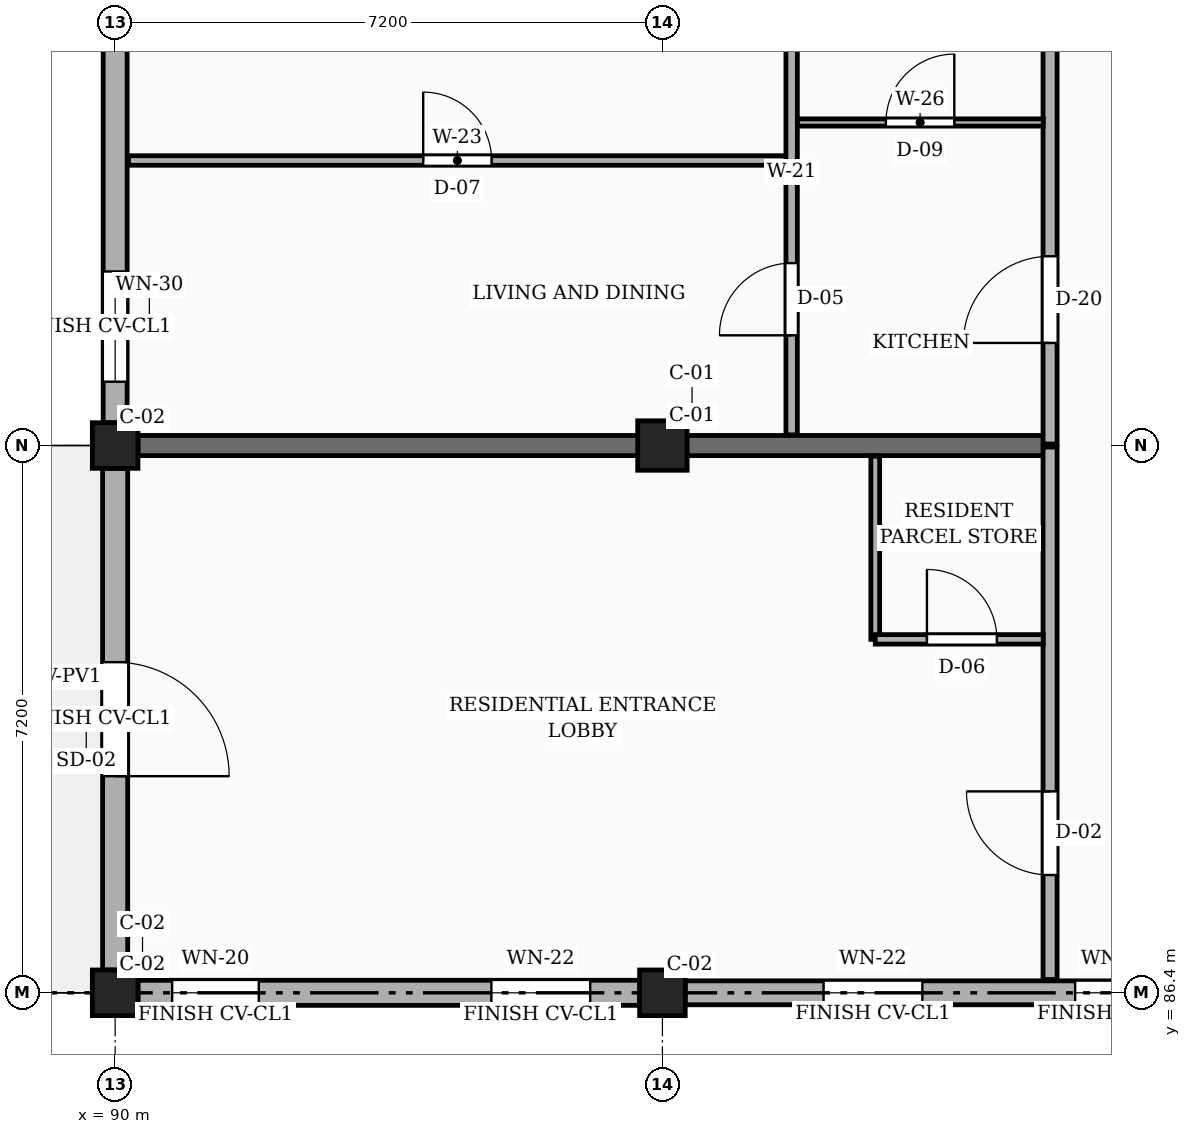
"""IFC4 building model, lengths in metres.
Left out: names, types, materials, properties, quantities, classifications, styles, units other than length and angle.
Written with IfcOpenShell. Run it as: python <this file> out.ifc"""

import sys

from ifc_helpers import new_model, si_unit, direction, frame, frame_2d, origin, origin_2d, place, context, subcontext, project, spatial, rectangle, extrude, element, fill, save


model = new_model("IFC4")
c1 = context("Model", 3, precision=1e-05, world=origin(), true_north=direction((0.0, 1.0)))
c2 = subcontext(c1, "Body", "Model", "MODEL_VIEW")
j1 = project(units=[si_unit("LENGTHUNIT", "METRE"), si_unit("PLANEANGLEUNIT", "RADIAN")], contexts=[c1])
p1 = place(None, origin())
s1 = spatial("IfcSite", under=j1, at=p1, CompositionType="ELEMENT")
p2 = place(p1, origin())
s2 = spatial("IfcBuilding", under=s1, at=p2, CompositionType="ELEMENT")
p3 = place(p2, origin())
s3 = spatial("IfcBuildingStorey", under=s2, at=p3, CompositionType="ELEMENT", Elevation=0.0)
for number, where, z_axis, x_axis in (
    (1, (90.0, 86.4, 0.0), (0.0, 0.0, 1.0), (1.0, 0.0, 0.0)),
    (2, (90.0, 93.6, 0.0), (0.0, 0.0, 1.0), (1.0, 0.0, 0.0)),
    (3, (97.2, 86.4, 0.0), (0.0, 0.0, 1.0), (1.0, 0.0, 0.0)),
):
    element("IfcColumn", number, at=place(p3, frame(where, z_axis=z_axis, x_axis=x_axis)), inside=s3, PredefinedType="COLUMN", context=c2, shape_type="SweptSolid", body=[
        extrude(rectangle(XDim=0.6, YDim=0.6, at=origin_2d()), origin(), (0.0, 0.0, 1.0), 4.5),
    ])
p4 = place(p3, frame((97.2, 93.6, 0.0), z_axis=(0.0, 0.0, 1.0), x_axis=(1.0, 0.0, 0.0)))
e4 = element("IfcColumn", 4, at=p4, inside=s3, PredefinedType="COLUMN", context=c2, shape_type="SweptSolid", body=[
    extrude(rectangle(XDim=0.65, YDim=0.65, at=origin_2d()), origin(), (0.0, 0.0, 1.0), 4.5),
])
p5 = place(p3, frame((90.3, 93.6, 0.0), z_axis=(0.0, 0.0, 1.0), x_axis=(1.0, 0.0, 0.0)))
e5 = element("IfcWall", 5, at=p5, inside=s3, PredefinedType="SOLIDWALL", context=c2, shape_type="SweptSolid", body=[
    extrude(rectangle(XDim=12.0, YDim=0.265, at=frame_2d((6.0, 0.0))), origin(), (0.0, 0.0, 1.0), 3.54),
])
p6 = place(p3, frame((90.3, 86.4, 0.0), z_axis=(0.0, 0.0, 1.0), x_axis=(1.0, 0.0, 0.0)))
e6 = element("IfcWall", 6, at=p6, inside=s3, PredefinedType="SOLIDWALL", context=c2, shape_type="SweptSolid", body=[
    extrude(rectangle(XDim=6.6, YDim=0.33, at=frame_2d((3.3, 0.0))), origin(), (0.0, 0.0, 1.0), 3.81),
])
p7 = place(p6, frame((0.45, 0.0, 0.78)))
e7 = element("IfcOpeningElement", 7, at=p7, cuts=e6, PredefinedType="OPENING", context=c2, shape_type="SweptSolid", body=[
    extrude(rectangle(XDim=1.14, YDim=1.36, at=frame_2d((0.57, 0.68))), frame((0.0, 0.175, 0.0), z_axis=(0.0, -1.0, 0.0), x_axis=(1.0, 0.0, 0.0)), (0.0, 0.0, 1.0), 0.35),
])
p8 = place(p6, frame((4.65, 0.0, 0.78)))
e8 = element("IfcOpeningElement", 8, at=p8, cuts=e6, PredefinedType="OPENING", context=c2, shape_type="SweptSolid", body=[
    extrude(rectangle(XDim=1.3, YDim=1.36, at=frame_2d((0.65, 0.68))), frame((0.0, 0.175, 0.0), z_axis=(0.0, -1.0, 0.0), x_axis=(1.0, 0.0, 0.0)), (0.0, 0.0, 1.0), 0.35),
])
p9 = place(p3, frame((97.5, 86.4, 0.0), z_axis=(0.0, 0.0, 1.0), x_axis=(1.0, 0.0, 0.0)))
e9 = element("IfcWall", 9, at=p9, inside=s3, PredefinedType="SOLIDWALL", context=c2, shape_type="SweptSolid", body=[
    extrude(rectangle(XDim=6.64, YDim=0.315, at=frame_2d((3.32, 0.0))), origin(), (0.0, 0.0, 1.0), 3.81),
])
p10 = place(p9, frame((1.82, 0.0, 0.78)))
e10 = element("IfcOpeningElement", 10, at=p10, cuts=e9, PredefinedType="OPENING", context=c2, shape_type="SweptSolid", body=[
    extrude(rectangle(XDim=1.3, YDim=1.36, at=frame_2d((0.65, 0.68))), frame((0.0, 0.167, 0.0), z_axis=(0.0, -1.0, 0.0), x_axis=(1.0, 0.0, 0.0)), (0.0, 0.0, 1.0), 0.335),
])
p11 = place(p9, frame((5.13, 0.0, 0.78)))
e11 = element("IfcOpeningElement", 11, at=p11, cuts=e9, PredefinedType="OPENING", context=c2, shape_type="SweptSolid", body=[
    extrude(rectangle(XDim=1.04, YDim=1.26, at=frame_2d((0.52, 0.63))), frame((0.0, 0.167, 0.0), z_axis=(0.0, -1.0, 0.0), x_axis=(1.0, 0.0, 0.0)), (0.0, 0.0, 1.0), 0.335),
])
p12 = place(p3, frame((90.0, 100.54, 0.0), z_axis=(0.0, 0.0, 1.0), x_axis=(0.0, -1.0, 0.0)))
e12 = element("IfcWall", 12, at=p12, inside=s3, PredefinedType="SOLIDWALL", context=c2, shape_type="SweptSolid", body=[
    extrude(rectangle(XDim=6.64, YDim=0.315, at=frame_2d((3.32, 0.0))), origin(), (0.0, 0.0, 1.0), 3.81),
])
p13 = place(p12, frame((0.45, 0.0, 0.78)))
e13 = element("IfcOpeningElement", 13, at=p13, cuts=e12, PredefinedType="OPENING", context=c2, shape_type="SweptSolid", body=[
    extrude(rectangle(XDim=1.25, YDim=1.44, at=frame_2d((0.625, 0.72))), frame((0.0, 0.167, 0.0), z_axis=(0.0, -1.0, 0.0), x_axis=(1.0, 0.0, 0.0)), (0.0, 0.0, 1.0), 0.335),
])
p14 = place(p12, frame((4.65, 0.0, 0.78)))
e14 = element("IfcOpeningElement", 14, at=p14, cuts=e12, PredefinedType="OPENING", context=c2, shape_type="SweptSolid", body=[
    extrude(rectangle(XDim=1.45, YDim=1.44, at=frame_2d((0.725, 0.72))), frame((0.0, 0.167, 0.0), z_axis=(0.0, -1.0, 0.0), x_axis=(1.0, 0.0, 0.0)), (0.0, 0.0, 1.0), 0.335),
])
p15 = place(p3, frame((90.0, 93.3, 0.0), z_axis=(0.0, 0.0, 1.0), x_axis=(0.0, -1.0, 0.0)))
e15 = element("IfcWall", 15, at=p15, inside=s3, PredefinedType="SOLIDWALL", context=c2, shape_type="SweptSolid", body=[
    extrude(rectangle(XDim=6.6, YDim=0.33, at=frame_2d((3.3, 0.0))), origin(), (0.0, 0.0, 1.0), 3.81),
])
p16 = place(p15, frame((2.55, 0.0, 0.0)))
e16 = element("IfcOpeningElement", 16, at=p16, cuts=e15, PredefinedType="OPENING", context=c2, shape_type="SweptSolid", body=[
    extrude(rectangle(XDim=1.5, YDim=2.2, at=frame_2d((0.75, 1.1))), frame((0.0, 0.175, 0.0), z_axis=(0.0, -1.0, 0.0), x_axis=(1.0, 0.0, 0.0)), (0.0, 0.0, 1.0), 0.35),
])
p17 = place(p3, frame((102.3, 86.575, 0.0), z_axis=(0.0, 0.0, 1.0), x_axis=(0.0, 1.0, 0.0)))
e17 = element("IfcWall", 17, at=p17, inside=s3, PredefinedType="PARTITIONING", context=c2, shape_type="SweptSolid", body=[
    extrude(rectangle(XDim=7.005, YDim=0.185, at=frame_2d((3.502, 0.0))), origin(), (0.0, 0.0, 1.0), 3.675),
])
p18 = place(p17, frame((1.375, 0.0, 0.0)))
e18 = element("IfcOpeningElement", 18, at=p18, cuts=e17, PredefinedType="OPENING", context=c2, shape_type="SweptSolid", body=[
    extrude(rectangle(XDim=1.1, YDim=2.15, at=frame_2d((0.55, 1.075))), frame((0.0, 0.103, 0.0), z_axis=(0.0, -1.0, 0.0), x_axis=(1.0, 0.0, 0.0)), (0.0, 0.0, 1.0), 0.205),
])
p19 = place(p3, frame((102.3, 93.62, 0.0), z_axis=(0.0, 0.0, 1.0), x_axis=(0.0, 1.0, 0.0)))
e19 = element("IfcWall", 19, at=p19, inside=s3, PredefinedType="PARTITIONING", context=c2, shape_type="SweptSolid", body=[
    extrude(rectangle(XDim=7.16, YDim=0.185, at=frame_2d((3.58, 0.0))), origin(), (0.0, 0.0, 1.0), 3.675),
])
p20 = place(p19, frame((1.33, 0.0, 0.0)))
e20 = element("IfcOpeningElement", 20, at=p20, cuts=e19, PredefinedType="OPENING", context=c2, shape_type="SweptSolid", body=[
    extrude(rectangle(XDim=1.14, YDim=2.18, at=frame_2d((0.57, 1.09))), frame((0.0, 0.103, 0.0), z_axis=(0.0, -1.0, 0.0), x_axis=(1.0, 0.0, 0.0)), (0.0, 0.0, 1.0), 0.205),
])
p21 = place(p3, frame((100.0, 91.05, 0.0), z_axis=(0.0, 0.0, 1.0), x_axis=(0.0, 1.0, 0.0)))
e21 = element("IfcWall", 21, at=p21, inside=s3, PredefinedType="PARTITIONING", context=c2, shape_type="SweptSolid", body=[
    extrude(rectangle(XDim=2.41, YDim=0.115, at=frame_2d((1.205, 0.0))), origin(), (0.0, 0.0, 1.0), 3.675),
])
p22 = place(p3, frame((100.0, 91.05, 0.0), z_axis=(0.0, 0.0, 1.0), x_axis=(1.0, 0.0, 0.0)))
e22 = element("IfcWall", 22, at=p22, inside=s3, PredefinedType="PARTITIONING", context=c2, shape_type="SweptSolid", body=[
    extrude(rectangle(XDim=2.21, YDim=0.125, at=frame_2d((1.105, 0.0))), origin(), (0.0, 0.0, 1.0), 3.675),
])
p23 = place(p22, frame((0.68, 0.0, 0.0)))
e23 = element("IfcOpeningElement", 23, at=p23, cuts=e22, PredefinedType="OPENING", context=c2, shape_type="SweptSolid", body=[
    extrude(rectangle(XDim=0.92, YDim=2.1, at=frame_2d((0.46, 1.05))), frame((0.0, 0.073, 0.0), z_axis=(0.0, -1.0, 0.0), x_axis=(1.0, 0.0, 0.0)), (0.0, 0.0, 1.0), 0.145),
])
p24 = place(p3, frame((90.175, 97.35, 0.0), z_axis=(0.0, 0.0, 1.0), x_axis=(1.0, 0.0, 0.0)))
e24 = element("IfcWall", 24, at=p24, inside=s3, PredefinedType="PARTITIONING", context=c2, shape_type="SweptSolid", body=[
    extrude(rectangle(XDim=8.655, YDim=0.125, at=frame_2d((4.328, 0.0))), origin(), (0.0, 0.0, 1.0), 3.675),
])
p25 = place(p24, frame((3.877, 0.0, 0.0)))
e25 = element("IfcOpeningElement", 25, at=p25, cuts=e24, PredefinedType="OPENING", context=c2, shape_type="SweptSolid", body=[
    extrude(rectangle(XDim=0.9, YDim=2.1, at=frame_2d((0.45, 1.05))), frame((0.0, 0.073, 0.0), z_axis=(0.0, -1.0, 0.0), x_axis=(1.0, 0.0, 0.0)), (0.0, 0.0, 1.0), 0.145),
])
p26 = place(p3, frame((98.97, 97.85, 0.0), z_axis=(0.0, 0.0, 1.0), x_axis=(1.0, 0.0, 0.0)))
e26 = element("IfcWall", 26, at=p26, inside=s3, PredefinedType="PARTITIONING", context=c2, shape_type="SweptSolid", body=[
    extrude(rectangle(XDim=3.24, YDim=0.095, at=frame_2d((1.62, 0.0))), origin(), (0.0, 0.0, 1.0), 3.675),
])
p27 = place(p26, frame((1.17, 0.0, 0.0)))
e27 = element("IfcOpeningElement", 27, at=p27, cuts=e26, PredefinedType="OPENING", context=c2, shape_type="SweptSolid", body=[
    extrude(rectangle(XDim=0.9, YDim=2.05, at=frame_2d((0.45, 1.025))), frame((0.0, 0.058, 0.0), z_axis=(0.0, -1.0, 0.0), x_axis=(1.0, 0.0, 0.0)), (0.0, 0.0, 1.0), 0.115),
])
p28 = place(p3, frame((98.9, 93.74, 0.0), z_axis=(0.0, 0.0, 1.0), x_axis=(0.0, 1.0, 0.0)))
e28 = element("IfcWall", 28, at=p28, inside=s3, PredefinedType="PARTITIONING", context=c2, shape_type="SweptSolid", body=[
    extrude(rectangle(XDim=6.92, YDim=0.15, at=frame_2d((3.46, 0.0))), origin(), (0.0, 0.0, 1.0), 3.675),
])
p29 = place(p28, frame((1.31, 0.0, 0.0)))
e29 = element("IfcOpeningElement", 29, at=p29, cuts=e28, PredefinedType="OPENING", context=c2, shape_type="SweptSolid", body=[
    extrude(rectangle(XDim=0.95, YDim=2.1, at=frame_2d((0.475, 1.05))), frame((0.0, 0.085, 0.0), z_axis=(0.0, -1.0, 0.0), x_axis=(1.0, 0.0, 0.0)), (0.0, 0.0, 1.0), 0.17),
])
p30 = place(p7, origin())
e30 = element("IfcWindow", 30, at=p30, inside=s3, PartitioningType="SINGLE_PANEL", PredefinedType="WINDOW", context=c2, shape_type="SweptSolid", body=[
    extrude(rectangle(XDim=1.14, YDim=1.36, at=frame_2d((0.57, 0.68))), frame((0.0, 0.03, 0.0), z_axis=(0.0, -1.0, 0.0), x_axis=(1.0, 0.0, 0.0)), (0.0, 0.0, 1.0), 0.06),
])
fill(e7, e30)
p31 = place(p8, origin())
e31 = element("IfcWindow", 31, at=p31, inside=s3, PartitioningType="SINGLE_PANEL", PredefinedType="WINDOW", context=c2, shape_type="SweptSolid", body=[
    extrude(rectangle(XDim=1.3, YDim=1.36, at=frame_2d((0.65, 0.68))), frame((0.0, 0.03, 0.0), z_axis=(0.0, -1.0, 0.0), x_axis=(1.0, 0.0, 0.0)), (0.0, 0.0, 1.0), 0.06),
])
fill(e8, e31)
p32 = place(p10, origin())
e32 = element("IfcWindow", 32, at=p32, inside=s3, PartitioningType="SINGLE_PANEL", PredefinedType="WINDOW", context=c2, shape_type="SweptSolid", body=[
    extrude(rectangle(XDim=1.3, YDim=1.36, at=frame_2d((0.65, 0.68))), frame((0.0, 0.03, 0.0), z_axis=(0.0, -1.0, 0.0), x_axis=(1.0, 0.0, 0.0)), (0.0, 0.0, 1.0), 0.06),
])
fill(e10, e32)
p33 = place(p11, origin())
e33 = element("IfcWindow", 33, at=p33, inside=s3, PartitioningType="SINGLE_PANEL", PredefinedType="WINDOW", context=c2, shape_type="SweptSolid", body=[
    extrude(rectangle(XDim=1.04, YDim=1.26, at=frame_2d((0.52, 0.63))), frame((0.0, 0.03, 0.0), z_axis=(0.0, -1.0, 0.0), x_axis=(1.0, 0.0, 0.0)), (0.0, 0.0, 1.0), 0.06),
])
fill(e11, e33)
p34 = place(p14, origin())
e34 = element("IfcWindow", 34, at=p34, inside=s3, PartitioningType="SINGLE_PANEL", PredefinedType="WINDOW", context=c2, shape_type="SweptSolid", body=[
    extrude(rectangle(XDim=1.45, YDim=1.44, at=frame_2d((0.725, 0.72))), frame((0.0, 0.03, 0.0), z_axis=(0.0, -1.0, 0.0), x_axis=(1.0, 0.0, 0.0)), (0.0, 0.0, 1.0), 0.06),
])
fill(e14, e34)
p35 = place(p16, frame((1.5, 0.0, 0.0), z_axis=(0.0, 0.0, 1.0), x_axis=(-1.0, 0.0, 0.0)))
e35 = element("IfcDoor", 35, at=p35, inside=s3, OperationType="SINGLE_SWING_RIGHT", PredefinedType="DOOR", context=c2, shape_type="SweptSolid", body=[
    extrude(rectangle(XDim=1.5, YDim=2.2, at=frame_2d((0.75, 1.1))), frame((0.0, 0.025, 0.0), z_axis=(0.0, -1.0, 0.0), x_axis=(1.0, 0.0, 0.0)), (0.0, 0.0, 1.0), 0.05),
])
fill(e16, e35)
p36 = place(p18, origin())
e36 = element("IfcDoor", 36, at=p36, inside=s3, OperationType="SINGLE_SWING_RIGHT", PredefinedType="DOOR", context=c2, shape_type="SweptSolid", body=[
    extrude(rectangle(XDim=1.1, YDim=2.15, at=frame_2d((0.55, 1.075))), frame((0.0, 0.025, 0.0), z_axis=(0.0, -1.0, 0.0), x_axis=(1.0, 0.0, 0.0)), (0.0, 0.0, 1.0), 0.05),
])
fill(e18, e36)
p37 = place(p20, origin())
e37 = element("IfcDoor", 37, at=p37, inside=s3, OperationType="SINGLE_SWING_LEFT", PredefinedType="DOOR", context=c2, shape_type="SweptSolid", body=[
    extrude(rectangle(XDim=1.14, YDim=2.18, at=frame_2d((0.57, 1.09))), frame((0.0, 0.025, 0.0), z_axis=(0.0, -1.0, 0.0), x_axis=(1.0, 0.0, 0.0)), (0.0, 0.0, 1.0), 0.05),
])
fill(e20, e37)
p38 = place(p23, origin())
e38 = element("IfcDoor", 38, at=p38, inside=s3, OperationType="SINGLE_SWING_LEFT", PredefinedType="DOOR", context=c2, shape_type="SweptSolid", body=[
    extrude(rectangle(XDim=0.92, YDim=2.1, at=frame_2d((0.46, 1.05))), frame((0.0, 0.025, 0.0), z_axis=(0.0, -1.0, 0.0), x_axis=(1.0, 0.0, 0.0)), (0.0, 0.0, 1.0), 0.05),
])
fill(e23, e38)
p39 = place(p25, origin())
e39 = element("IfcDoor", 39, at=p39, inside=s3, OperationType="SINGLE_SWING_LEFT", PredefinedType="DOOR", context=c2, shape_type="SweptSolid", body=[
    extrude(rectangle(XDim=0.9, YDim=2.1, at=frame_2d((0.45, 1.05))), frame((0.0, 0.025, 0.0), z_axis=(0.0, -1.0, 0.0), x_axis=(1.0, 0.0, 0.0)), (0.0, 0.0, 1.0), 0.05),
])
fill(e25, e39)
p40 = place(p27, origin())
e40 = element("IfcDoor", 40, at=p40, inside=s3, OperationType="SINGLE_SWING_RIGHT", PredefinedType="DOOR", context=c2, shape_type="SweptSolid", body=[
    extrude(rectangle(XDim=0.9, YDim=2.05, at=frame_2d((0.45, 1.025))), frame((0.0, 0.025, 0.0), z_axis=(0.0, -1.0, 0.0), x_axis=(1.0, 0.0, 0.0)), (0.0, 0.0, 1.0), 0.05),
])
fill(e27, e40)
p41 = place(p29, origin())
e41 = element("IfcDoor", 41, at=p41, inside=s3, OperationType="SINGLE_SWING_LEFT", PredefinedType="DOOR", context=c2, shape_type="SweptSolid", body=[
    extrude(rectangle(XDim=0.95, YDim=2.1, at=frame_2d((0.475, 1.05))), frame((0.0, 0.025, 0.0), z_axis=(0.0, -1.0, 0.0), x_axis=(1.0, 0.0, 0.0)), (0.0, 0.0, 1.0), 0.05),
])
fill(e29, e41)
save(model, sys.argv[1])
